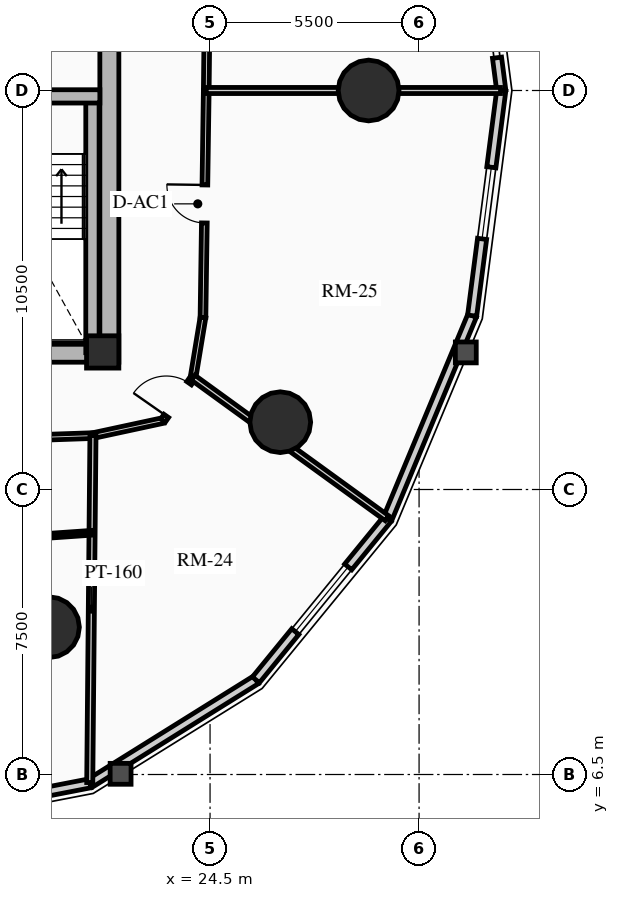
"""IFC4 building model, lengths in metres.
Left out: names, types, materials, properties, quantities, classifications, styles, units other than length and angle.
Written with IfcOpenShell. Run it as: python <this file> out.ifc"""

import sys

from ifc_helpers import new_model, si_unit, direction, frame, frame_2d, origin, origin_2d, place, context, subcontext, project, spatial, rectangle, circle, extrude, source, transform, mapped, element, fill, save


model = new_model("IFC4")
c1 = context("Model", 3, precision=1e-05, world=origin(), true_north=direction((0.0, 1.0)))
c2 = subcontext(c1, "Body", "Model", "MODEL_VIEW")
j1 = project(units=[si_unit("LENGTHUNIT", "METRE"), si_unit("PLANEANGLEUNIT", "RADIAN")], contexts=[c1])
p1 = place(None, origin())
s1 = spatial("IfcSite", under=j1, at=p1, CompositionType="ELEMENT")
p2 = place(p1, origin())
s2 = spatial("IfcBuilding", under=s1, at=p2, CompositionType="ELEMENT")
p3 = place(p2, frame((0.0, 0.0, 54.01)))
s3 = spatial("IfcBuildingStorey", under=s2, at=p3, CompositionType="ELEMENT", Elevation=54.01)
p4 = place(p3, frame((21.85, 17.35, 0.0), z_axis=(0.0, 0.0, 1.0), x_axis=(0.0, 1.0, 0.0)))
e1 = element("IfcWall", 1, at=p4, inside=s3, PredefinedType="SHEAR", context=c2, shape_type="SweptSolid", body=[
    extrude(rectangle(XDim=14.3, YDim=0.5, at=frame_2d((7.15, 0.0))), origin(), (0.0, 0.0, 1.0), 2.91),
])
p5 = place(p3, frame((11.15, 17.6, 0.0), z_axis=(0.0, 0.0, 1.0), x_axis=(1.0, 0.0, 0.0)))
e2 = element("IfcWall", 2, at=p5, inside=s3, PredefinedType="SHEAR", context=c2, shape_type="SweptSolid", body=[
    extrude(rectangle(XDim=10.7, YDim=0.5, at=frame_2d((5.35, 0.0))), origin(), (0.0, 0.0, 1.0), 2.91),
])
m1 = source(origin(), c2, "Body", "SweptSolid", [
    extrude(rectangle(XDim=1.5, YDim=2.02, at=frame_2d((0.75, 1.01))), frame((0.0, 0.26, 0.0), z_axis=(0.0, -1.0, 0.0), x_axis=(1.0, 0.0, 0.0)), (0.0, 0.0, 1.0), 0.52),
])
p6 = place(p5, frame((5.45, 0.0, 0.0)))
e3 = element("IfcOpeningElement", 3, at=p6, cuts=e2, PredefinedType="OPENING", context=c2, shape_type="MappedRepresentation", body=[
    mapped(m1, transform((0.0, 0.0, 0.0), x_axis=(1.0, 0.0, 0.0), y_axis=(0.0, 1.0, 0.0), z_axis=(0.0, 0.0, 1.0), scale=1.0)),
])
p7 = place(p3, frame((21.405, 17.6, 0.0), z_axis=(0.0, 0.0, 1.0), x_axis=(0.0, 1.0, 0.0)))
e4 = element("IfcWall", 4, at=p7, inside=s3, PredefinedType="SHEAR", context=c2, shape_type="SweptSolid", body=[
    extrude(rectangle(XDim=6.745, YDim=0.35, at=frame_2d((3.373, 0.0))), origin(), (0.0, 0.0, 1.0), 2.91),
])
p8 = place(p3, frame((18.315, 24.345, 0.0), z_axis=(0.0, 0.0, 1.0), x_axis=(1.0, 0.0, 0.0)))
e5 = element("IfcWall", 5, at=p8, inside=s3, PredefinedType="SHEAR", context=c2, shape_type="SweptSolid", body=[
    extrude(rectangle(XDim=3.285, YDim=0.35, at=frame_2d((1.643, 0.0))), origin(), (0.0, 0.0, 1.0), 2.91),
])
p9 = place(p3, frame((21.675, 17.62, 0.0), z_axis=(0.0, 0.0, 1.0), x_axis=(1.0, 0.0, 0.0)))
e6 = element("IfcColumn", 6, at=p9, inside=s3, PredefinedType="COLUMN", context=c2, shape_type="SweptSolid", body=[
    extrude(rectangle(XDim=0.85, YDim=0.85, at=origin_2d()), origin(), (0.0, 0.0, 1.0), 2.91),
])
for number, where, z_axis, x_axis in (
    (7, (28.672, 24.5, 0.0), (0.0, 0.0, 1.0), (1.0, 0.0, 0.0)),
    (8, (20.261, 10.377, 0.0), (0.0, 0.0, 1.0), (1.0, 0.0, 0.0)),
    (9, (26.347, 15.771, 0.0), (0.0, 0.0, 1.0), (1.0, 0.0, 0.0)),
):
    element("IfcColumn", number, at=place(p3, frame(where, z_axis=z_axis, x_axis=x_axis)), inside=s3, PredefinedType="USERDEFINED", context=c2, shape_type="SweptSolid", body=[
        extrude(circle(Radius=0.8, at=origin_2d()), origin(), (0.0, 0.0, 1.0), 2.91),
    ])
p10 = place(p3, frame((32.051, 25.363, 0.0), z_axis=(0.0, 0.0, 1.0), x_axis=(0.128523364007, -0.991706481225, 0.0)))
e10 = element("IfcWall", 10, at=p10, inside=s3, PredefinedType="SOLIDWALL", context=c2, shape_type="SweptSolid", body=[
    extrude(rectangle(XDim=0.87, YDim=0.24, at=frame_2d((0.435, 0.0))), origin(), (0.0, 0.0, 1.0), 2.635),
])
p11 = place(p3, frame((21.34, 6.268, 0.0), z_axis=(0.0, 0.0, 1.0), x_axis=(-0.981725274071, -0.190303668512, 0.0)))
e11 = element("IfcWall", 11, at=p11, inside=s3, PredefinedType="SOLIDWALL", context=c2, shape_type="SweptSolid", body=[
    extrude(rectangle(XDim=4.93, YDim=0.24, at=frame_2d((2.465, 0.0))), origin(), (0.0, 0.0, 1.0), 2.073),
])
m2 = source(origin(), c2, "Body", "SweptSolid", [
    extrude(rectangle(XDim=1.9, YDim=1.35, at=frame_2d((0.95, 0.675))), frame((0.0, 0.13, 0.0), z_axis=(0.0, -1.0, 0.0), x_axis=(1.0, 0.0, 0.0)), (0.0, 0.0, 1.0), 0.26),
])
p12 = place(p11, frame((1.515, 0.0, 0.65)))
e12 = element("IfcOpeningElement", 12, at=p12, cuts=e11, PredefinedType="OPENING", context=c2, shape_type="MappedRepresentation", body=[
    mapped(m2, transform((0.0, 0.0, 0.0), x_axis=(1.0, 0.0, 0.0), y_axis=(0.0, 1.0, 0.0), z_axis=(0.0, 0.0, 1.0), scale=1.0)),
])
p13 = place(p3, frame((25.707, 8.991, 0.0), z_axis=(0.0, 0.0, 1.0), x_axis=(-0.848533613342, -0.529141481107, 0.0)))
e13 = element("IfcWall", 13, at=p13, inside=s3, PredefinedType="SOLIDWALL", context=c2, shape_type="SweptSolid", body=[
    extrude(rectangle(XDim=5.146, YDim=0.24, at=frame_2d((2.573, 0.0))), origin(), (0.0, 0.0, 1.0), 2.073),
])
p14 = place(p3, frame((29.172, 13.232, 0.0), z_axis=(0.0, 0.0, 1.0), x_axis=(-0.632713287022, -0.77438614168, 0.0)))
e14 = element("IfcWall", 14, at=p14, inside=s3, PredefinedType="SOLIDWALL", context=c2, shape_type="SweptSolid", body=[
    extrude(rectangle(XDim=5.477, YDim=0.24, at=frame_2d((2.738, 0.0))), origin(), (0.0, 0.0, 1.0), 2.073),
])
m3 = source(origin(), c2, "Body", "SweptSolid", [
    extrude(rectangle(XDim=2.2, YDim=1.35, at=frame_2d((1.1, 0.675))), frame((0.0, 0.13, 0.0), z_axis=(0.0, -1.0, 0.0), x_axis=(1.0, 0.0, 0.0)), (0.0, 0.0, 1.0), 0.26),
])
p15 = place(p14, frame((1.638, 0.0, 0.65)))
e15 = element("IfcOpeningElement", 15, at=p15, cuts=e14, PredefinedType="OPENING", context=c2, shape_type="MappedRepresentation", body=[
    mapped(m3, transform((0.0, 0.0, 0.0), x_axis=(1.0, 0.0, 0.0), y_axis=(0.0, 1.0, 0.0), z_axis=(0.0, 0.0, 1.0), scale=1.0)),
])
p16 = place(p3, frame((31.396, 18.576, 0.0), z_axis=(0.0, 0.0, 1.0), x_axis=(-0.384348836956, -0.923187939442, 0.0)))
e16 = element("IfcWall", 16, at=p16, inside=s3, PredefinedType="SOLIDWALL", context=c2, shape_type="SweptSolid", body=[
    extrude(rectangle(XDim=5.789, YDim=0.24, at=frame_2d((2.894, 0.0))), origin(), (0.0, 0.0, 1.0), 2.073),
])
p17 = place(p3, frame((32.163, 24.5, 0.0), z_axis=(0.0, 0.0, 1.0), x_axis=(-0.128339641463, -0.991730274031, 0.0)))
e17 = element("IfcWall", 17, at=p17, inside=s3, PredefinedType="SOLIDWALL", context=c2, shape_type="SweptSolid", body=[
    extrude(rectangle(XDim=5.973, YDim=0.24, at=frame_2d((2.987, 0.0))), origin(), (0.0, 0.0, 1.0), 2.073),
])
p18 = place(p17, frame((2.037, 0.0, 0.65)))
e18 = element("IfcOpeningElement", 18, at=p18, cuts=e17, PredefinedType="OPENING", context=c2, shape_type="MappedRepresentation", body=[
    mapped(m2, transform((0.0, 0.0, 0.0), x_axis=(1.0, 0.0, 0.0), y_axis=(0.0, 1.0, 0.0), z_axis=(0.0, 0.0, 1.0), scale=1.0)),
])
p19 = place(p3, frame((24.4, 24.5, 0.0), z_axis=(0.0, 0.0, 1.0), x_axis=(0.011359710161, 0.999935476411, 0.0)))
e19 = element("IfcWall", 19, at=p19, inside=s3, PredefinedType="PARTITIONING", context=c2, shape_type="SweptSolid", body=[
    extrude(rectangle(XDim=6.082, YDim=0.15, at=frame_2d((3.041, 0.0))), origin(), (0.0, 0.0, 1.0), 2.159),
])
m4 = source(origin(), c2, "Body", "SweptSolid", [
    extrude(rectangle(XDim=1.05, YDim=2.015, at=frame_2d((0.525, 1.007))), frame((0.0, 0.085, 0.0), z_axis=(0.0, -1.0, 0.0), x_axis=(1.0, 0.0, 0.0)), (0.0, 0.0, 1.0), 0.17),
])
p20 = place(p19, frame((2.516, 0.0, 0.0)))
e20 = element("IfcOpeningElement", 20, at=p20, cuts=e19, PredefinedType="OPENING", context=c2, shape_type="MappedRepresentation", body=[
    mapped(m4, transform((0.0, 0.0, 0.0), x_axis=(1.0, 0.0, 0.0), y_axis=(0.0, 1.0, 0.0), z_axis=(0.0, 0.0, 1.0), scale=1.0)),
])
p21 = place(p3, frame((14.781, 15.191, 0.0), z_axis=(0.0, 0.0, 1.0), x_axis=(0.999412963972, 0.034259705842, 0.0)))
e21 = element("IfcWall", 21, at=p21, inside=s3, PredefinedType="PARTITIONING", context=c2, shape_type="SweptSolid", body=[
    extrude(rectangle(XDim=6.642, YDim=0.15, at=frame_2d((3.321, 0.0))), origin(), (0.0, 0.0, 1.0), 2.159),
])
p22 = place(p3, frame((21.419, 15.418, 0.0), z_axis=(0.0, 0.0, 1.0), x_axis=(0.977540384091, 0.210748184977, 0.0)))
e22 = element("IfcWall", 22, at=p22, inside=s3, PredefinedType="PARTITIONING", context=c2, shape_type="SweptSolid", body=[
    extrude(rectangle(XDim=1.887, YDim=0.15, at=frame_2d((0.944, 0.0))), origin(), (0.0, 0.0, 1.0), 2.205),
])
p23 = place(p3, frame((23.263, 15.816, 0.0), z_axis=(0.0, 0.0, 1.0), x_axis=(0.572652947117, 0.819797903241, 0.0)))
e23 = element("IfcWall", 23, at=p23, inside=s3, PredefinedType="PARTITIONING", context=c2, shape_type="SweptSolid", body=[
    extrude(rectangle(XDim=1.377, YDim=0.15, at=frame_2d((0.688, 0.0))), origin(), (0.0, 0.0, 1.0), 2.159),
])
p24 = place(p23, frame((0.147, 0.0, 0.0)))
e24 = element("IfcOpeningElement", 24, at=p24, cuts=e23, PredefinedType="OPENING", context=c2, shape_type="MappedRepresentation", body=[
    mapped(m4, transform((0.0, 0.0, 0.0), x_axis=(1.0, 0.0, 0.0), y_axis=(0.0, 1.0, 0.0), z_axis=(0.0, 0.0, 1.0), scale=1.0)),
])
p25 = place(p3, frame((24.052, 16.945, 0.0), z_axis=(0.0, 0.0, 1.0), x_axis=(0.162869842843, 0.986647563364, 0.0)))
e25 = element("IfcWall", 25, at=p25, inside=s3, PredefinedType="PARTITIONING", context=c2, shape_type="SweptSolid", body=[
    extrude(rectangle(XDim=1.605, YDim=0.15, at=frame_2d((0.803, 0.0))), origin(), (0.0, 0.0, 1.0), 2.205),
])
p26 = place(p3, frame((24.313, 18.529, 0.0), z_axis=(0.0, 0.0, 1.0), x_axis=(0.014472275982, 0.99989527113, 0.0)))
e26 = element("IfcWall", 26, at=p26, inside=s3, PredefinedType="PARTITIONING", context=c2, shape_type="SweptSolid", body=[
    extrude(rectangle(XDim=5.972, YDim=0.15, at=frame_2d((2.986, 0.0))), origin(), (0.0, 0.0, 1.0), 2.635),
])
m5 = source(origin(), c2, "Body", "SweptSolid", [
    extrude(rectangle(XDim=1.0, YDim=2.015, at=frame_2d((0.5, 1.007))), frame((0.0, 0.085, 0.0), z_axis=(0.0, -1.0, 0.0), x_axis=(1.0, 0.0, 0.0)), (0.0, 0.0, 1.0), 0.17),
])
p27 = place(p26, frame((2.486, 0.0, 0.0)))
e27 = element("IfcOpeningElement", 27, at=p27, cuts=e26, PredefinedType="OPENING", context=c2, shape_type="MappedRepresentation", body=[
    mapped(m5, transform((0.0, 0.0, 0.0), x_axis=(1.0, 0.0, 0.0), y_axis=(0.0, 1.0, 0.0), z_axis=(0.0, 0.0, 1.0), scale=1.0)),
])
p28 = place(p3, frame((24.4, 24.5, 0.0), z_axis=(0.0, 0.0, 1.0), x_axis=(1.0, 0.0, 0.0)))
e28 = element("IfcWall", 28, at=p28, inside=s3, PredefinedType="PARTITIONING", context=c2, shape_type="SweptSolid", body=[
    extrude(rectangle(XDim=7.743, YDim=0.16, at=frame_2d((3.872, 0.0))), origin(), (0.0, 0.0, 1.0), 2.073),
])
p29 = place(p3, frame((21.419, 15.418, 0.0), z_axis=(0.0, 0.0, 1.0), x_axis=(-0.009277675551, -0.999956961442, 0.0)))
e29 = element("IfcWall", 29, at=p29, inside=s3, PredefinedType="PARTITIONING", context=c2, shape_type="SweptSolid", body=[
    extrude(rectangle(XDim=9.131, YDim=0.16, at=frame_2d((4.566, 0.0))), origin(), (0.0, 0.0, 1.0), 2.073),
])
p30 = place(p3, frame((24.052, 16.945, 0.0), z_axis=(0.0, 0.0, 1.0), x_axis=(0.809544185493, -0.587058950817, 0.0)))
e30 = element("IfcWall", 30, at=p30, inside=s3, PredefinedType="PARTITIONING", context=c2, shape_type="SweptSolid", body=[
    extrude(rectangle(XDim=6.304, YDim=0.16, at=frame_2d((3.152, 0.0))), origin(), (0.0, 0.0, 1.0), 2.073),
])
p31 = place(p3, frame((15.262, 12.435, 0.0), z_axis=(0.0, 0.0, 1.0), x_axis=(0.997593149667, 0.069339077998, 0.0)))
e31 = element("IfcWall", 31, at=p31, inside=s3, PredefinedType="PARTITIONING", context=c2, shape_type="SweptSolid", body=[
    extrude(rectangle(XDim=6.148, YDim=0.125, at=frame_2d((3.074, 0.0))), origin(), (0.0, 0.0, 1.0), 2.159),
])
m6 = source(origin(), c2, "Body", "SweptSolid", [
    extrude(rectangle(XDim=0.9, YDim=2.005, at=frame_2d((0.45, 1.002))), frame((0.0, 0.073, 0.0), z_axis=(0.0, -1.0, 0.0), x_axis=(1.0, 0.0, 0.0)), (0.0, 0.0, 1.0), 0.145),
])
p32 = place(p31, frame((1.372, 0.0, 0.0)))
e32 = element("IfcOpeningElement", 32, at=p32, cuts=e31, PredefinedType="OPENING", context=c2, shape_type="MappedRepresentation", body=[
    mapped(m6, transform((0.0, 0.0, 0.0), x_axis=(1.0, 0.0, 0.0), y_axis=(0.0, 1.0, 0.0), z_axis=(0.0, 0.0, 1.0), scale=1.0)),
])
m7 = source(origin(), c2, "Body", "SweptSolid", [
    extrude(rectangle(XDim=2.2, YDim=1.35, at=frame_2d((1.1, 0.675))), frame((0.0, 0.03, 0.0), z_axis=(0.0, -1.0, 0.0), x_axis=(1.0, 0.0, 0.0)), (0.0, 0.0, 1.0), 0.06),
])
p33 = place(p15, origin())
e33 = element("IfcWindow", 33, at=p33, inside=s3, PartitioningType="DOUBLE_PANEL_VERTICAL", PredefinedType="WINDOW", context=c2, shape_type="MappedRepresentation", body=[
    mapped(m7, transform((0.0, 0.0, 0.0), x_axis=(1.0, 0.0, 0.0), y_axis=(0.0, 1.0, 0.0), z_axis=(0.0, 0.0, 1.0), scale=1.0)),
])
fill(e15, e33)
m8 = source(origin(), c2, "Body", "SweptSolid", [
    extrude(rectangle(XDim=1.9, YDim=1.35, at=frame_2d((0.95, 0.675))), frame((0.0, 0.03, 0.0), z_axis=(0.0, -1.0, 0.0), x_axis=(1.0, 0.0, 0.0)), (0.0, 0.0, 1.0), 0.06),
])
p34 = place(p18, origin())
e34 = element("IfcWindow", 34, at=p34, inside=s3, PartitioningType="DOUBLE_PANEL_VERTICAL", PredefinedType="WINDOW", context=c2, shape_type="MappedRepresentation", body=[
    mapped(m8, transform((0.0, 0.0, 0.0), x_axis=(1.0, 0.0, 0.0), y_axis=(0.0, 1.0, 0.0), z_axis=(0.0, 0.0, 1.0), scale=1.0)),
])
fill(e18, e34)
m9 = source(origin(), c2, "Body", "SweptSolid", [
    extrude(rectangle(XDim=1.05, YDim=2.015, at=frame_2d((0.525, 1.007))), frame((0.0, 0.025, 0.0), z_axis=(0.0, -1.0, 0.0), x_axis=(1.0, 0.0, 0.0)), (0.0, 0.0, 1.0), 0.05),
])
p35 = place(p24, origin())
e35 = element("IfcDoor", 35, at=p35, inside=s3, OperationType="SINGLE_SWING_LEFT", PredefinedType="DOOR", context=c2, shape_type="MappedRepresentation", body=[
    mapped(m9, transform((0.0, 0.0, 0.0), x_axis=(1.0, 0.0, 0.0), y_axis=(0.0, 1.0, 0.0), z_axis=(0.0, 0.0, 1.0), scale=1.0)),
])
fill(e24, e35)
m10 = source(origin(), c2, "Body", "SweptSolid", [
    extrude(rectangle(XDim=1.0, YDim=2.015, at=frame_2d((0.5, 1.007))), frame((0.0, 0.025, 0.0), z_axis=(0.0, -1.0, 0.0), x_axis=(1.0, 0.0, 0.0)), (0.0, 0.0, 1.0), 0.05),
])
p36 = place(p27, origin())
e36 = element("IfcDoor", 36, at=p36, inside=s3, OperationType="SINGLE_SWING_RIGHT", PredefinedType="DOOR", context=c2, shape_type="MappedRepresentation", body=[
    mapped(m10, transform((0.0, 0.0, 0.0), x_axis=(1.0, 0.0, 0.0), y_axis=(0.0, 1.0, 0.0), z_axis=(0.0, 0.0, 1.0), scale=1.0)),
])
fill(e27, e36)
save(model, sys.argv[1])
